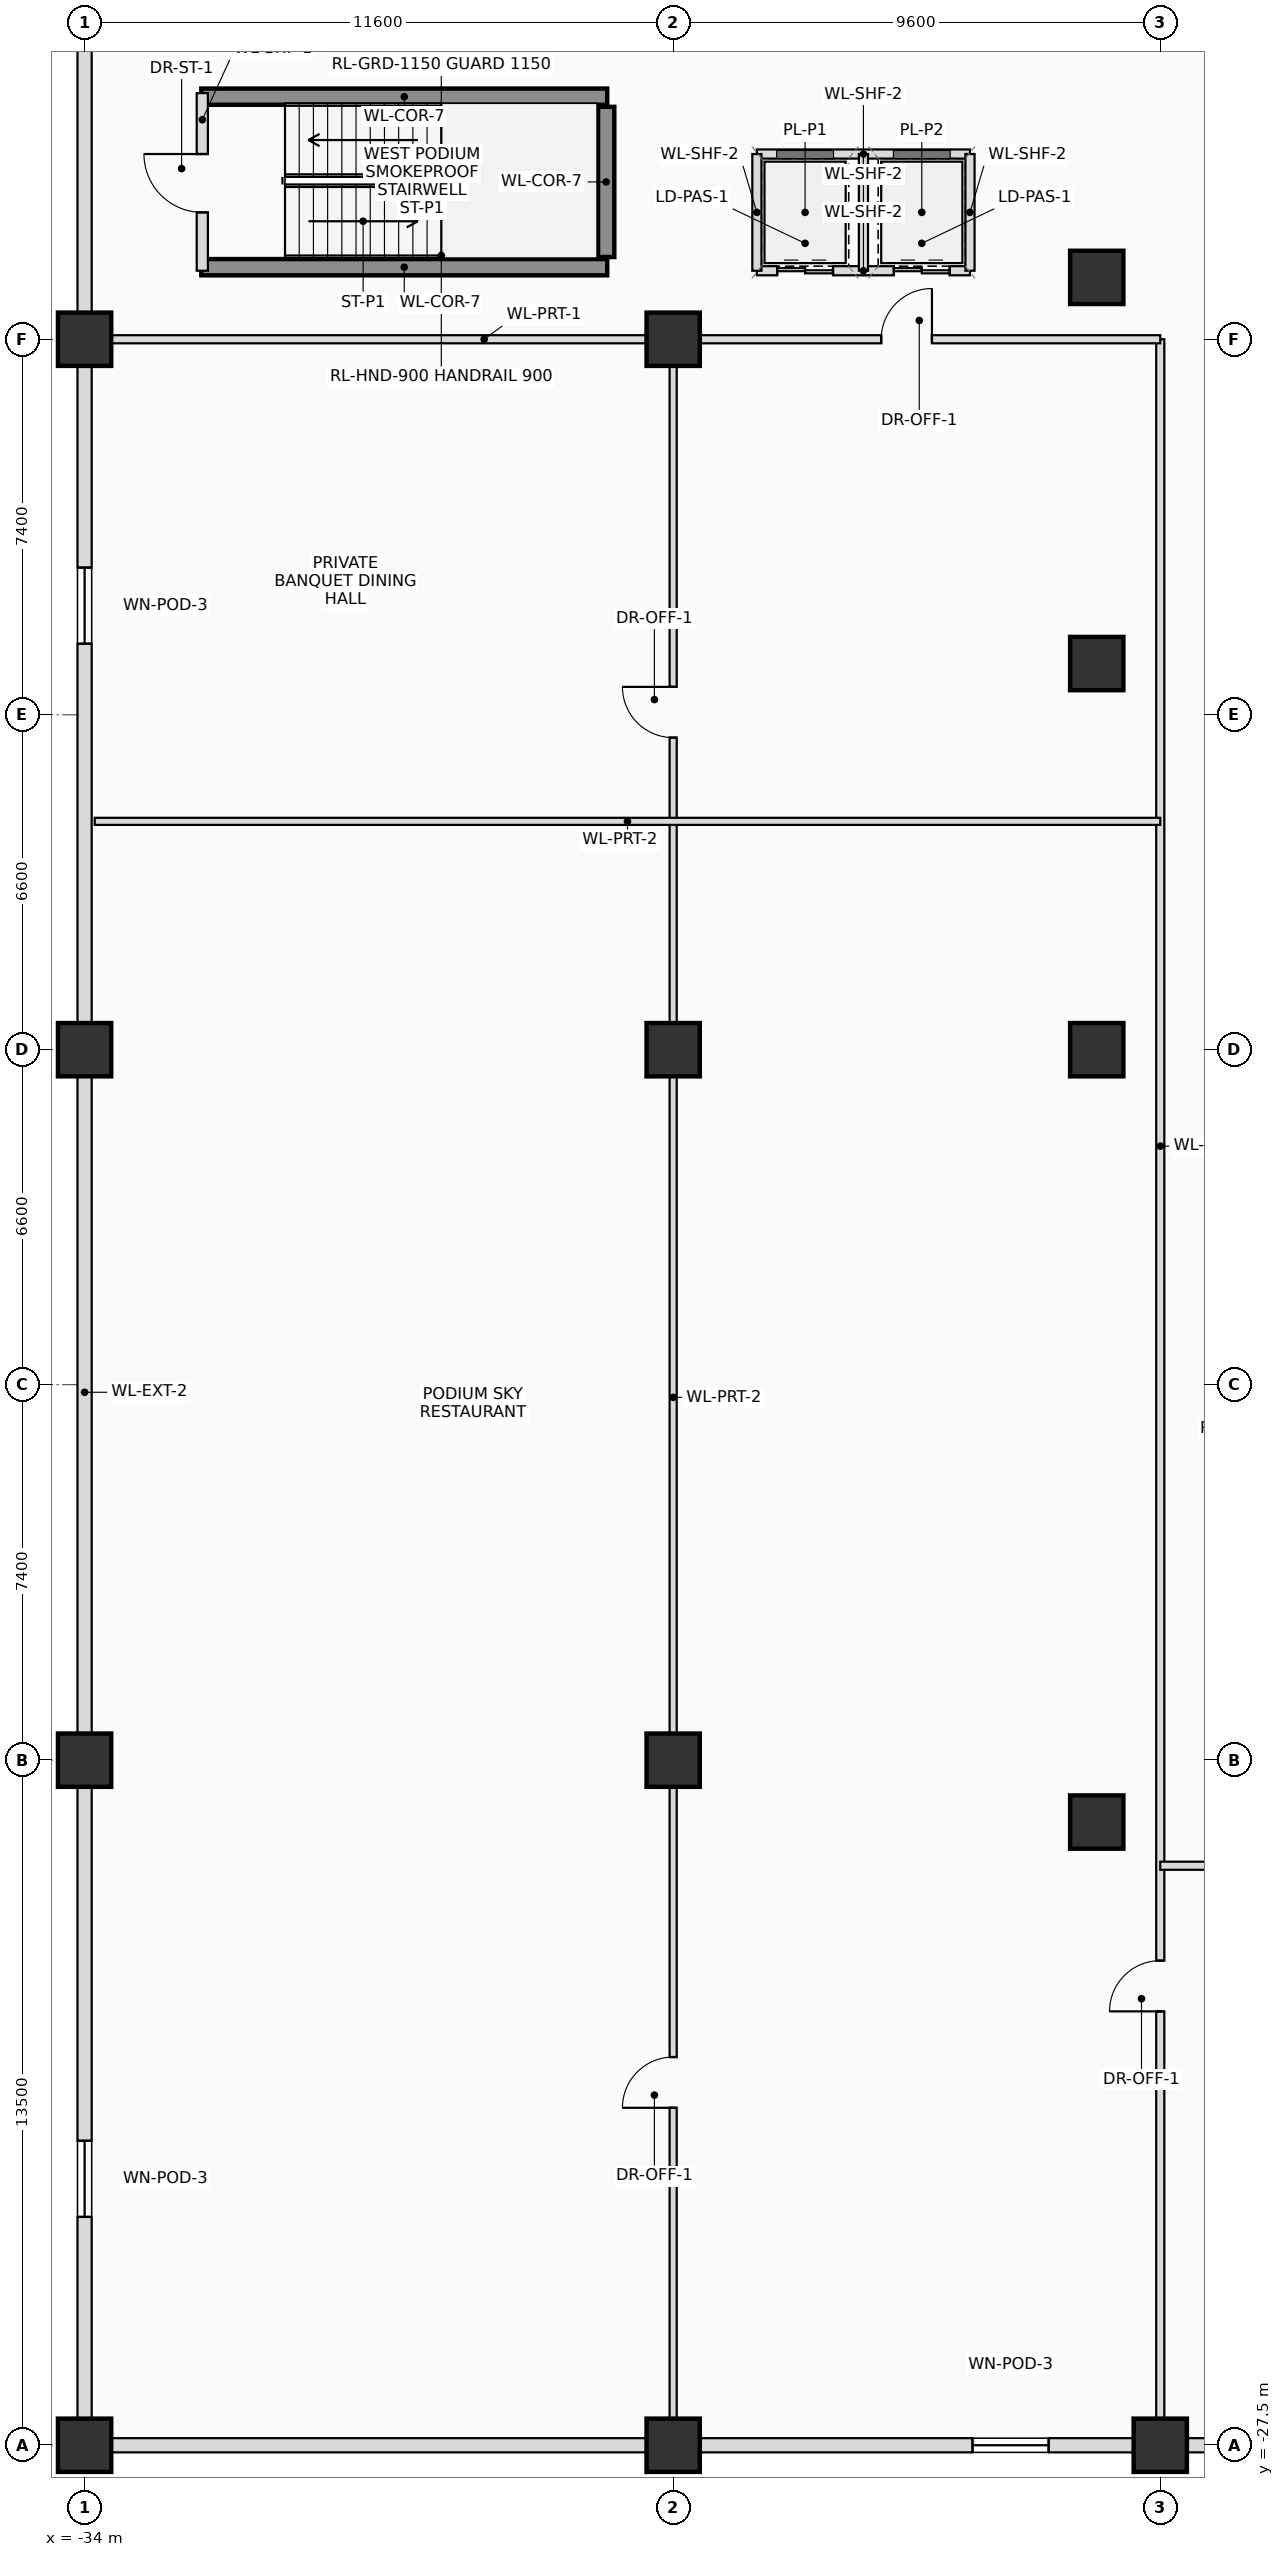
"""IFC4 building model, lengths in metres.
Left out: names, types, materials, properties, quantities, classifications, styles, units other than length and angle.
Written with IfcOpenShell. Run it as: python <this file> out.ifc"""

import sys

from ifc_helpers import new_model, si_unit, direction, frame, frame_2d, origin, origin_2d, place, context, subcontext, project, spatial, rectangle, extrude, source, transform, mapped, element, fill, save


model = new_model("IFC4")
c1 = context("Model", 3, precision=1e-05, world=origin(), true_north=direction((0.0, 1.0)))
c2 = subcontext(c1, "Body", "Model", "MODEL_VIEW")
j1 = project(units=[si_unit("LENGTHUNIT", "METRE"), si_unit("PLANEANGLEUNIT", "RADIAN")], contexts=[c1])
p1 = place(None, origin())
s1 = spatial("IfcSite", under=j1, at=p1, CompositionType="ELEMENT")
p2 = place(p1, origin())
s2 = spatial("IfcBuilding", under=s1, at=p2, CompositionType="ELEMENT")
p3 = place(p2, frame((0.0, 0.0, 16.2)))
s3 = spatial("IfcBuildingStorey", under=s2, at=p3, CompositionType="ELEMENT", Elevation=16.2)
for number, where, z_axis, x_axis in (
    (1, (-31.7, 18.78, 0.0), (0.0, 0.0, 1.0), (1.0, 0.0, 0.0)),
    (2, (-31.7, 15.42, 0.0), (0.0, 0.0, 1.0), (1.0, 0.0, 0.0)),
):
    element("IfcWall", number, at=place(p3, frame(where, z_axis=z_axis, x_axis=x_axis)), inside=s3, PredefinedType="SHEAR", context=c2, shape_type="SweptSolid", body=[
        extrude(rectangle(XDim=8.0, YDim=0.32, at=frame_2d((4.0, 0.0))), origin(), (0.0, 0.0, 1.0), 3.9),
    ])
p4 = place(p3, frame((-23.72, 15.62, 0.0), z_axis=(0.0, 0.0, 1.0), x_axis=(0.0, 1.0, 0.0)))
e3 = element("IfcWall", 3, at=p4, inside=s3, PredefinedType="SHEAR", context=c2, shape_type="SweptSolid", body=[
    extrude(rectangle(XDim=2.96, YDim=0.32, at=frame_2d((1.48, 0.0))), origin(), (0.0, 0.0, 1.0), 3.9),
])
m1 = source(origin(), c2, "Body", "SweptSolid", [
    extrude(rectangle(XDim=1.05, YDim=1.05, at=origin_2d()), origin(), (0.0, 0.0, 1.0), 3.58),
])
for number, where, z_axis, x_axis in (
    (4, (-34.0, -27.5, 0.0), (0.0, 0.0, 1.0), (1.0, 0.0, 0.0)),
    (5, (-22.4, -27.5, 0.0), (0.0, 0.0, 1.0), (1.0, 0.0, 0.0)),
    (6, (-12.8, -27.5, 0.0), (0.0, 0.0, 1.0), (1.0, 0.0, 0.0)),
    (7, (-34.0, -14.0, 0.0), (0.0, 0.0, 1.0), (1.0, 0.0, 0.0)),
    (8, (-22.4, -14.0, 0.0), (0.0, 0.0, 1.0), (1.0, 0.0, 0.0)),
    (9, (-34.0, 0.0, 0.0), (0.0, 0.0, 1.0), (1.0, 0.0, 0.0)),
    (10, (-22.4, 0.0, 0.0), (0.0, 0.0, 1.0), (1.0, 0.0, 0.0)),
    (11, (-34.0, 14.0, 0.0), (0.0, 0.0, 1.0), (1.0, 0.0, 0.0)),
    (12, (-22.4, 14.0, 0.0), (0.0, 0.0, 1.0), (1.0, 0.0, 0.0)),
    (13, (-14.052, 15.219, 0.0), (0.0, 0.0, 1.0), (1.0, 0.0, 0.0)),
    (14, (-14.052, 7.61, 0.0), (0.0, 0.0, 1.0), (1.0, 0.0, 0.0)),
    (15, (-14.052, 0.0, 0.0), (0.0, 0.0, 1.0), (1.0, 0.0, 0.0)),
    (16, (-14.052, -15.219, 0.0), (0.0, 0.0, 1.0), (1.0, 0.0, 0.0)),
):
    element("IfcColumn", number, at=place(p3, frame(where, z_axis=z_axis, x_axis=x_axis)), inside=s3, PredefinedType="COLUMN", context=c2, shape_type="MappedRepresentation", body=[
        mapped(m1, transform((0.0, 0.0, 0.0), scale=1.0)),
    ])
p5 = place(p3, frame((34.0, -27.5, 0.0), z_axis=(0.0, 0.0, 1.0), x_axis=(-1.0, 0.0, 0.0)))
e17 = element("IfcWall", 17, at=p5, inside=s3, PredefinedType="SOLIDWALL", context=c2, shape_type="SweptSolid", body=[
    extrude(rectangle(XDim=68.0, YDim=0.28, at=frame_2d((34.0, 0.0))), origin(), (0.0, 0.0, 1.0), 2.64),
])
p6 = place(p5, frame((16.0, 0.0, 0.65)))
e18 = element("IfcOpeningElement", 18, at=p6, cuts=e17, PredefinedType="OPENING", context=c2, shape_type="SweptSolid", body=[
    extrude(rectangle(XDim=1.5, YDim=1.8, at=frame_2d((0.75, 0.9))), frame((0.0, 0.15, 0.0), z_axis=(0.0, -1.0, 0.0), x_axis=(1.0, 0.0, 0.0)), (0.0, 0.0, 1.0), 0.3),
])
p7 = place(p5, frame((49.0, 0.0, 0.65)))
e19 = element("IfcOpeningElement", 19, at=p7, cuts=e17, PredefinedType="OPENING", context=c2, shape_type="SweptSolid", body=[
    extrude(rectangle(XDim=1.5, YDim=1.8, at=frame_2d((0.75, 0.9))), frame((0.0, 0.15, 0.0), z_axis=(0.0, -1.0, 0.0), x_axis=(1.0, 0.0, 0.0)), (0.0, 0.0, 1.0), 0.3),
])
p8 = place(p3, frame((-34.0, -27.5, 0.0), z_axis=(0.0, 0.0, 1.0), x_axis=(0.0, 1.0, 0.0)))
e20 = element("IfcWall", 20, at=p8, inside=s3, PredefinedType="SOLIDWALL", context=c2, shape_type="SweptSolid", body=[
    extrude(rectangle(XDim=57.0, YDim=0.28, at=frame_2d((28.5, 0.0))), origin(), (0.0, 0.0, 1.0), 2.64),
])
p9 = place(p8, frame((4.5, 0.0, 0.65)))
e21 = element("IfcOpeningElement", 21, at=p9, cuts=e20, PredefinedType="OPENING", context=c2, shape_type="SweptSolid", body=[
    extrude(rectangle(XDim=1.5, YDim=1.8, at=frame_2d((0.75, 0.9))), frame((0.0, 0.15, 0.0), z_axis=(0.0, -1.0, 0.0), x_axis=(1.0, 0.0, 0.0)), (0.0, 0.0, 1.0), 0.3),
])
p10 = place(p8, frame((35.5, 0.0, 0.65)))
e22 = element("IfcOpeningElement", 22, at=p10, cuts=e20, PredefinedType="OPENING", context=c2, shape_type="SweptSolid", body=[
    extrude(rectangle(XDim=1.5, YDim=1.8, at=frame_2d((0.75, 0.9))), frame((0.0, 0.15, 0.0), z_axis=(0.0, -1.0, 0.0), x_axis=(1.0, 0.0, 0.0)), (0.0, 0.0, 1.0), 0.3),
])
p11 = place(p3, frame((-31.68, 15.35, 0.0), z_axis=(0.0, 0.0, 1.0), x_axis=(0.0, 1.0, 0.0)))
e23 = element("IfcWall", 23, at=p11, inside=s3, PredefinedType="PLUMBINGWALL", context=c2, shape_type="SweptSolid", body=[
    extrude(rectangle(XDim=3.5, YDim=0.22, at=frame_2d((1.75, 0.0))), origin(), (0.0, 0.0, 1.0), 3.56),
])
p12 = place(p11, frame((1.15, 0.0, 0.0)))
e24 = element("IfcOpeningElement", 24, at=p12, cuts=e23, PredefinedType="OPENING", context=c2, shape_type="SweptSolid", body=[
    extrude(rectangle(XDim=1.15, YDim=2.15, at=frame_2d((0.575, 1.075))), frame((0.0, 0.12, 0.0), z_axis=(0.0, -1.0, 0.0), x_axis=(1.0, 0.0, 0.0)), (0.0, 0.0, 1.0), 0.24),
])
p13 = place(p3, frame((-20.75, 15.35, 0.0), z_axis=(0.0, 0.0, 1.0), x_axis=(1.0, 0.0, 0.0)))
e25 = element("IfcWall", 25, at=p13, inside=s3, PredefinedType="PLUMBINGWALL", context=c2, shape_type="SweptSolid", body=[
    extrude(rectangle(XDim=4.2, YDim=0.18, at=frame_2d((2.1, 0.0))), origin(), (0.0, 0.0, 1.0), 3.56),
])
p14 = place(p13, frame((0.4, 0.0, 0.0)))
e26 = element("IfcOpeningElement", 26, at=p14, cuts=e25, PredefinedType="OPENING", context=c2, shape_type="SweptSolid", body=[
    extrude(rectangle(XDim=1.1, YDim=2.2, at=frame_2d((0.55, 1.1))), frame((0.0, 0.1, 0.0), z_axis=(0.0, -1.0, 0.0), x_axis=(1.0, 0.0, 0.0)), (0.0, 0.0, 1.0), 0.2),
])
p15 = place(p13, frame((2.7, 0.0, 0.0)))
e27 = element("IfcOpeningElement", 27, at=p15, cuts=e25, PredefinedType="OPENING", context=c2, shape_type="SweptSolid", body=[
    extrude(rectangle(XDim=1.1, YDim=2.2, at=frame_2d((0.55, 1.1))), frame((0.0, 0.1, 0.0), z_axis=(0.0, -1.0, 0.0), x_axis=(1.0, 0.0, 0.0)), (0.0, 0.0, 1.0), 0.2),
])
p16 = place(p3, frame((-20.75, 17.65, 0.0), z_axis=(0.0, 0.0, 1.0), x_axis=(1.0, 0.0, 0.0)))
e28 = element("IfcWall", 28, at=p16, inside=s3, PredefinedType="PLUMBINGWALL", context=c2, shape_type="SweptSolid", body=[
    extrude(rectangle(XDim=4.2, YDim=0.18, at=frame_2d((2.1, 0.0))), origin(), (0.0, 0.0, 1.0), 3.56),
])
for number, where, z_axis, x_axis in (
    (29, (-20.75, 15.35, 0.0), (0.0, 0.0, 1.0), (0.0, 1.0, 0.0)),
    (30, (-18.65, 15.35, 0.0), (0.0, 0.0, 1.0), (0.0, 1.0, 0.0)),
    (31, (-16.55, 15.35, 0.0), (0.0, 0.0, 1.0), (0.0, 1.0, 0.0)),
):
    element("IfcWall", number, at=place(p3, frame(where, z_axis=z_axis, x_axis=x_axis)), inside=s3, PredefinedType="PLUMBINGWALL", context=c2, shape_type="SweptSolid", body=[
        extrude(rectangle(XDim=2.3, YDim=0.18, at=frame_2d((1.15, 0.0))), origin(), (0.0, 0.0, 1.0), 3.56),
    ])
p17 = place(p3, frame((-22.4, -27.35, 0.0), z_axis=(0.0, 0.0, 1.0), x_axis=(0.0, 1.0, 0.0)))
e32 = element("IfcWall", 32, at=p17, inside=s3, PredefinedType="PARTITIONING", context=c2, shape_type="SweptSolid", body=[
    extrude(rectangle(XDim=41.35, YDim=0.14, at=frame_2d((20.675, 0.0))), origin(), (0.0, 0.0, 1.0), 3.56),
])
p18 = place(p17, frame((6.5, 0.0, 0.0)))
e33 = element("IfcOpeningElement", 33, at=p18, cuts=e32, PredefinedType="OPENING", context=c2, shape_type="SweptSolid", body=[
    extrude(rectangle(XDim=1.0, YDim=2.25, at=frame_2d((0.5, 1.125))), frame((0.0, 0.08, 0.0), z_axis=(0.0, -1.0, 0.0), x_axis=(1.0, 0.0, 0.0)), (0.0, 0.0, 1.0), 0.16),
])
p19 = place(p17, frame((33.5, 0.0, 0.0)))
e34 = element("IfcOpeningElement", 34, at=p19, cuts=e32, PredefinedType="OPENING", context=c2, shape_type="SweptSolid", body=[
    extrude(rectangle(XDim=1.0, YDim=2.25, at=frame_2d((0.5, 1.125))), frame((0.0, 0.08, 0.0), z_axis=(0.0, -1.0, 0.0), x_axis=(1.0, 0.0, 0.0)), (0.0, 0.0, 1.0), 0.16),
])
p20 = place(p3, frame((-12.8, -27.35, 0.0), z_axis=(0.0, 0.0, 1.0), x_axis=(0.0, 1.0, 0.0)))
e35 = element("IfcWall", 35, at=p20, inside=s3, PredefinedType="PARTITIONING", context=c2, shape_type="SweptSolid", body=[
    extrude(rectangle(XDim=41.35, YDim=0.16, at=frame_2d((20.675, 0.0))), origin(), (0.0, 0.0, 1.0), 3.015),
])
p21 = place(p20, frame((8.4, 0.0, 0.0)))
e36 = element("IfcOpeningElement", 36, at=p21, cuts=e35, PredefinedType="OPENING", context=c2, shape_type="SweptSolid", body=[
    extrude(rectangle(XDim=1.0, YDim=2.25, at=frame_2d((0.5, 1.125))), frame((0.0, 0.09, 0.0), z_axis=(0.0, -1.0, 0.0), x_axis=(1.0, 0.0, 0.0)), (0.0, 0.0, 1.0), 0.18),
])
p22 = place(p3, frame((-33.8, 14.0, 0.0), z_axis=(0.0, 0.0, 1.0), x_axis=(1.0, 0.0, 0.0)))
e37 = element("IfcWall", 37, at=p22, inside=s3, PredefinedType="PARTITIONING", context=c2, shape_type="SweptSolid", body=[
    extrude(rectangle(XDim=21.0, YDim=0.16, at=frame_2d((10.5, 0.0))), origin(), (0.0, 0.0, 1.0), 3.015),
])
p23 = place(p22, frame((15.5, 0.0, 0.0)))
e38 = element("IfcOpeningElement", 38, at=p23, cuts=e37, PredefinedType="OPENING", context=c2, shape_type="SweptSolid", body=[
    extrude(rectangle(XDim=1.0, YDim=2.25, at=frame_2d((0.5, 1.125))), frame((0.0, 0.09, 0.0), z_axis=(0.0, -1.0, 0.0), x_axis=(1.0, 0.0, 0.0)), (0.0, 0.0, 1.0), 0.18),
])
p24 = place(p3, frame((-33.8, 4.5, 0.0), z_axis=(0.0, 0.0, 1.0), x_axis=(1.0, 0.0, 0.0)))
e39 = element("IfcWall", 39, at=p24, inside=s3, PredefinedType="PARTITIONING", context=c2, shape_type="SweptSolid", body=[
    extrude(rectangle(XDim=21.0, YDim=0.14, at=frame_2d((10.5, 0.0))), origin(), (0.0, 0.0, 1.0), 3.56),
])
p25 = place(p3, frame((-12.8, -16.08, 0.0), z_axis=(0.0, 0.0, 1.0), x_axis=(1.0, 0.0, 0.0)))
e40 = element("IfcWall", 40, at=p25, inside=s3, PredefinedType="PARTITIONING", context=c2, shape_type="SweptSolid", body=[
    extrude(rectangle(XDim=25.6, YDim=0.16, at=frame_2d((12.8, 0.0))), origin(), (0.0, 0.0, 1.0), 3.015),
])
p26 = place(p25, frame((4.2, 0.0, 0.0)))
e41 = element("IfcOpeningElement", 41, at=p26, cuts=e40, PredefinedType="OPENING", context=c2, shape_type="SweptSolid", body=[
    extrude(rectangle(XDim=1.0, YDim=2.25, at=frame_2d((0.5, 1.125))), frame((0.0, 0.09, 0.0), z_axis=(0.0, -1.0, 0.0), x_axis=(1.0, 0.0, 0.0)), (0.0, 0.0, 1.0), 0.18),
])
p27 = place(p25, frame((20.2, 0.0, 0.0)))
e42 = element("IfcOpeningElement", 42, at=p27, cuts=e40, PredefinedType="OPENING", context=c2, shape_type="SweptSolid", body=[
    extrude(rectangle(XDim=1.0, YDim=2.25, at=frame_2d((0.5, 1.125))), frame((0.0, 0.09, 0.0), z_axis=(0.0, -1.0, 0.0), x_axis=(1.0, 0.0, 0.0)), (0.0, 0.0, 1.0), 0.18),
])
p28 = place(p7, origin())
e43 = element("IfcWindow", 43, at=p28, inside=s3, PartitioningType="SINGLE_PANEL", PredefinedType="WINDOW", context=c2, shape_type="SweptSolid", body=[
    extrude(rectangle(XDim=1.5, YDim=1.8, at=frame_2d((0.75, 0.9))), frame((0.0, 0.03, 0.0), z_axis=(0.0, -1.0, 0.0), x_axis=(1.0, 0.0, 0.0)), (0.0, 0.0, 1.0), 0.06),
])
fill(e19, e43)
p29 = place(p9, origin())
e44 = element("IfcWindow", 44, at=p29, inside=s3, PartitioningType="SINGLE_PANEL", PredefinedType="WINDOW", context=c2, shape_type="SweptSolid", body=[
    extrude(rectangle(XDim=1.5, YDim=1.8, at=frame_2d((0.75, 0.9))), frame((0.0, 0.03, 0.0), z_axis=(0.0, -1.0, 0.0), x_axis=(1.0, 0.0, 0.0)), (0.0, 0.0, 1.0), 0.06),
])
fill(e21, e44)
p30 = place(p10, origin())
e45 = element("IfcWindow", 45, at=p30, inside=s3, PartitioningType="SINGLE_PANEL", PredefinedType="WINDOW", context=c2, shape_type="SweptSolid", body=[
    extrude(rectangle(XDim=1.5, YDim=1.8, at=frame_2d((0.75, 0.9))), frame((0.0, 0.03, 0.0), z_axis=(0.0, -1.0, 0.0), x_axis=(1.0, 0.0, 0.0)), (0.0, 0.0, 1.0), 0.06),
])
fill(e22, e45)
p31 = place(p12, origin())
e46 = element("IfcDoor", 46, at=p31, inside=s3, OperationType="SINGLE_SWING_RIGHT", PredefinedType="DOOR", context=c2, shape_type="SweptSolid", body=[
    extrude(rectangle(XDim=1.15, YDim=2.15, at=frame_2d((0.575, 1.075))), frame((0.0, 0.025, 0.0), z_axis=(0.0, -1.0, 0.0), x_axis=(1.0, 0.0, 0.0)), (0.0, 0.0, 1.0), 0.05),
])
fill(e24, e46)
p32 = place(p14, origin())
e47 = element("IfcDoor", 47, at=p32, inside=s3, OperationType="DOUBLE_DOOR_SLIDING", PredefinedType="DOOR", context=c2, shape_type="SweptSolid", body=[
    extrude(rectangle(XDim=1.1, YDim=2.2, at=frame_2d((0.55, 1.1))), frame((0.0, 0.025, 0.0), z_axis=(0.0, -1.0, 0.0), x_axis=(1.0, 0.0, 0.0)), (0.0, 0.0, 1.0), 0.05),
])
fill(e26, e47)
p33 = place(p15, origin())
e48 = element("IfcDoor", 48, at=p33, inside=s3, OperationType="DOUBLE_DOOR_SLIDING", PredefinedType="DOOR", context=c2, shape_type="SweptSolid", body=[
    extrude(rectangle(XDim=1.1, YDim=2.2, at=frame_2d((0.55, 1.1))), frame((0.0, 0.025, 0.0), z_axis=(0.0, -1.0, 0.0), x_axis=(1.0, 0.0, 0.0)), (0.0, 0.0, 1.0), 0.05),
])
fill(e27, e48)
p34 = place(p18, origin())
e49 = element("IfcDoor", 49, at=p34, inside=s3, OperationType="SINGLE_SWING_LEFT", PredefinedType="DOOR", context=c2, shape_type="SweptSolid", body=[
    extrude(rectangle(XDim=1.0, YDim=2.25, at=frame_2d((0.5, 1.125))), frame((0.0, 0.025, 0.0), z_axis=(0.0, -1.0, 0.0), x_axis=(1.0, 0.0, 0.0)), (0.0, 0.0, 1.0), 0.05),
])
fill(e33, e49)
p35 = place(p19, origin())
e50 = element("IfcDoor", 50, at=p35, inside=s3, OperationType="SINGLE_SWING_RIGHT", PredefinedType="DOOR", context=c2, shape_type="SweptSolid", body=[
    extrude(rectangle(XDim=1.0, YDim=2.25, at=frame_2d((0.5, 1.125))), frame((0.0, 0.025, 0.0), z_axis=(0.0, -1.0, 0.0), x_axis=(1.0, 0.0, 0.0)), (0.0, 0.0, 1.0), 0.05),
])
fill(e34, e50)
p36 = place(p21, origin())
e51 = element("IfcDoor", 51, at=p36, inside=s3, OperationType="SINGLE_SWING_LEFT", PredefinedType="DOOR", context=c2, shape_type="SweptSolid", body=[
    extrude(rectangle(XDim=1.0, YDim=2.25, at=frame_2d((0.5, 1.125))), frame((0.0, 0.025, 0.0), z_axis=(0.0, -1.0, 0.0), x_axis=(1.0, 0.0, 0.0)), (0.0, 0.0, 1.0), 0.05),
])
fill(e36, e51)
p37 = place(p23, origin())
e52 = element("IfcDoor", 52, at=p37, inside=s3, OperationType="SINGLE_SWING_RIGHT", PredefinedType="DOOR", context=c2, shape_type="SweptSolid", body=[
    extrude(rectangle(XDim=1.0, YDim=2.25, at=frame_2d((0.5, 1.125))), frame((0.0, 0.025, 0.0), z_axis=(0.0, -1.0, 0.0), x_axis=(1.0, 0.0, 0.0)), (0.0, 0.0, 1.0), 0.05),
])
fill(e38, e52)
save(model, sys.argv[1])
